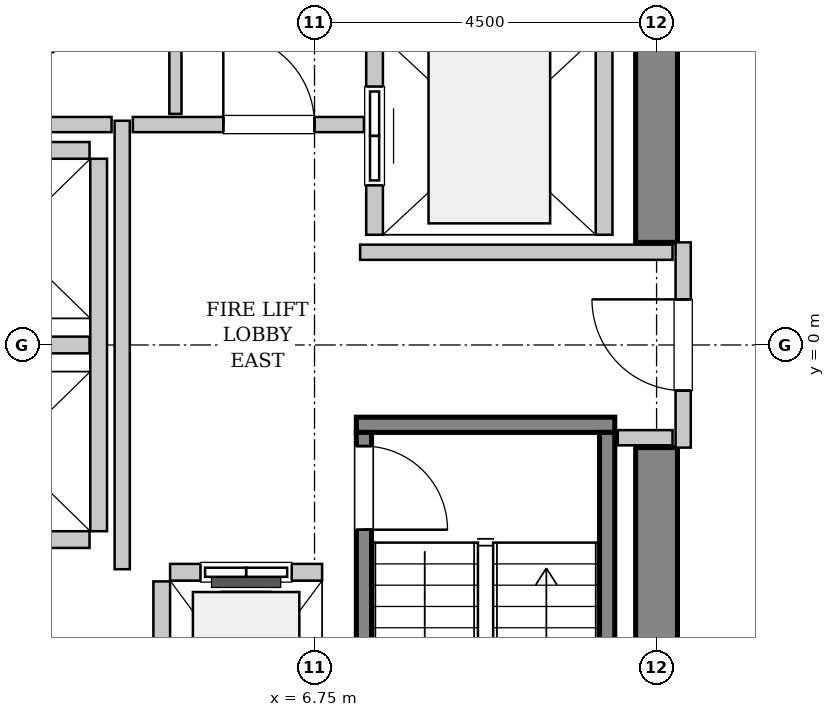
"""IFC4 building model, lengths in metres.
Left out: names, types, materials, properties, quantities, classifications, styles, units other than length and angle.
Written with IfcOpenShell. Run it as: python <this file> out.ifc"""

import sys

from ifc_helpers import new_model, si_unit, direction, frame, frame_2d, origin, place, context, subcontext, project, spatial, rectangle, extrude, source, transform, mapped, element, fill, save


model = new_model("IFC4")
c1 = context("Model", 3, precision=1e-05, world=origin(), true_north=direction((0.0, 1.0)))
c2 = subcontext(c1, "Body", "Model", "MODEL_VIEW")
j1 = project(units=[si_unit("LENGTHUNIT", "METRE"), si_unit("PLANEANGLEUNIT", "RADIAN")], contexts=[c1])
p1 = place(None, origin())
s1 = spatial("IfcSite", under=j1, at=p1, CompositionType="ELEMENT")
p2 = place(p1, origin())
s2 = spatial("IfcBuilding", under=s1, at=p2, CompositionType="ELEMENT")
p3 = place(p2, frame((0.0, 0.0, 152.6)))
s3 = spatial("IfcBuildingStorey", under=s2, at=p3, CompositionType="ELEMENT", Elevation=152.6)
m1 = source(origin(), c2, "Body", "SweptSolid", [
    extrude(rectangle(XDim=7.375, YDim=0.55, at=frame_2d((3.688, 0.0))), origin(), (0.0, 0.0, 1.0), 3.8),
])
for number, where, z_axis, x_axis in (
    (1, (11.25, -8.725, 0.0), (0.0, 0.0, 1.0), (0.0, 1.0, 0.0)),
    (2, (11.25, 1.35, 0.0), (0.0, 0.0, 1.0), (0.0, 1.0, 0.0)),
):
    element("IfcWall", number, at=place(p3, frame(where, z_axis=z_axis, x_axis=x_axis)), inside=s3, PredefinedType="SHEAR", context=c2, shape_type="MappedRepresentation", body=[
        mapped(m1, transform((0.0, 0.0, 0.0), x_axis=(1.0, 0.0, 0.0), y_axis=(0.0, 1.0, 0.0), z_axis=(0.0, 0.0, 1.0), scale=1.0)),
    ])
m2 = source(origin(), c2, "Body", "SweptSolid", [
    extrude(rectangle(XDim=3.4, YDim=0.2, at=frame_2d((1.7, 0.0))), origin(), (0.0, 0.0, 1.0), 3.8),
])
p4 = place(p3, frame((7.3, -1.05, 0.0), z_axis=(0.0, 0.0, 1.0), x_axis=(1.0, 0.0, 0.0)))
e3 = element("IfcWall", 3, at=p4, inside=s3, PredefinedType="SOLIDWALL", context=c2, shape_type="MappedRepresentation", body=[
    mapped(m2, transform((0.0, 0.0, 0.0), x_axis=(1.0, 0.0, 0.0), y_axis=(0.0, 1.0, 0.0), z_axis=(0.0, 0.0, 1.0), scale=1.0)),
])
m3 = source(origin(), c2, "Body", "SweptSolid", [
    extrude(rectangle(XDim=7.1, YDim=0.2, at=frame_2d((3.55, 0.0))), origin(), (0.0, 0.0, 1.0), 3.8),
])
p5 = place(p3, frame((7.4, -1.15, 0.0), z_axis=(0.0, 0.0, 1.0), x_axis=(0.0, -1.0, 0.0)))
e4 = element("IfcWall", 4, at=p5, inside=s3, PredefinedType="SOLIDWALL", context=c2, shape_type="MappedRepresentation", body=[
    mapped(m3, transform((0.0, 0.0, 0.0), x_axis=(1.0, 0.0, 0.0), y_axis=(0.0, 1.0, 0.0), z_axis=(0.0, 0.0, 1.0), scale=1.0)),
])
p6 = place(p5, frame((0.18, 0.0, 0.0)))
e5 = element("IfcOpeningElement", 5, at=p6, cuts=e4, PredefinedType="OPENING", context=c2, shape_type="SweptSolid", body=[
    extrude(rectangle(XDim=1.1, YDim=2.15, at=frame_2d((0.55, 1.075))), frame((0.0, 0.11, 0.0), z_axis=(0.0, -1.0, 0.0), x_axis=(1.0, 0.0, 0.0)), (0.0, 0.0, 1.0), 0.22),
])
p7 = place(p3, frame((10.6, -1.15, 0.0), z_axis=(0.0, 0.0, 1.0), x_axis=(0.0, -1.0, 0.0)))
e6 = element("IfcWall", 6, at=p7, inside=s3, PredefinedType="SOLIDWALL", context=c2, shape_type="MappedRepresentation", body=[
    mapped(m3, transform((0.0, 0.0, 0.0), x_axis=(1.0, 0.0, 0.0), y_axis=(0.0, 1.0, 0.0), z_axis=(0.0, 0.0, 1.0), scale=1.0)),
])
m4 = source(origin(), c2, "Body", "SweptSolid", [
    extrude(rectangle(XDim=2.0, YDim=0.22, at=frame_2d((1.0, 0.0))), origin(), (0.0, 0.0, 1.0), 3.535),
])
p8 = place(p3, frame((6.85, -2.99, 0.0), z_axis=(0.0, 0.0, 1.0), x_axis=(-1.0, 0.0, 0.0)))
e7 = element("IfcWall", 7, at=p8, inside=s3, PredefinedType="SOLIDWALL", context=c2, shape_type="MappedRepresentation", body=[
    mapped(m4, transform((0.0, 0.0, 0.0), x_axis=(1.0, 0.0, 0.0), y_axis=(0.0, 1.0, 0.0), z_axis=(0.0, 0.0, 1.0), scale=1.0)),
])
p9 = place(p8, frame((0.4, 0.0, 0.0)))
e8 = element("IfcOpeningElement", 8, at=p9, cuts=e7, PredefinedType="OPENING", context=c2, shape_type="SweptSolid", body=[
    extrude(rectangle(XDim=1.2, YDim=2.2, at=frame_2d((0.6, 1.1))), frame((0.0, 0.12, 0.0), z_axis=(0.0, -1.0, 0.0), x_axis=(1.0, 0.0, 0.0)), (0.0, 0.0, 1.0), 0.24),
])
m5 = source(origin(), c2, "Body", "SweptSolid", [
    extrude(rectangle(XDim=2.68, YDim=0.22, at=frame_2d((1.34, 0.0))), origin(), (0.0, 0.0, 1.0), 3.535),
])
p10 = place(p3, frame((4.74, -3.11, 0.0), z_axis=(0.0, 0.0, 1.0), x_axis=(0.0, -1.0, 0.0)))
e9 = element("IfcWall", 9, at=p10, inside=s3, PredefinedType="SOLIDWALL", context=c2, shape_type="MappedRepresentation", body=[
    mapped(m5, transform((0.0, 0.0, 0.0), x_axis=(1.0, 0.0, 0.0), y_axis=(0.0, 1.0, 0.0), z_axis=(0.0, 0.0, 1.0), scale=1.0)),
])
m6 = source(origin(), c2, "Body", "SweptSolid", [
    extrude(rectangle(XDim=5.45, YDim=0.22, at=frame_2d((2.725, 0.0))), origin(), (0.0, 0.0, 1.0), 3.535),
])
p11 = place(p3, frame((7.54, 6.9, 0.0), z_axis=(0.0, 0.0, 1.0), x_axis=(0.0, -1.0, 0.0)))
e10 = element("IfcWall", 10, at=p11, inside=s3, PredefinedType="SOLIDWALL", context=c2, shape_type="MappedRepresentation", body=[
    mapped(m6, transform((0.0, 0.0, 0.0), x_axis=(1.0, 0.0, 0.0), y_axis=(0.0, 1.0, 0.0), z_axis=(0.0, 0.0, 1.0), scale=1.0)),
])
p12 = place(p11, frame((3.5, 0.0, 0.0)))
e11 = element("IfcOpeningElement", 11, at=p12, cuts=e10, PredefinedType="OPENING", context=c2, shape_type="SweptSolid", body=[
    extrude(rectangle(XDim=1.3, YDim=2.3, at=frame_2d((0.65, 1.15))), frame((0.0, 0.12, 0.0), z_axis=(0.0, -1.0, 0.0), x_axis=(1.0, 0.0, 0.0)), (0.0, 0.0, 1.0), 0.24),
])
p13 = place(p11, frame((0.65, 0.0, 0.0)))
e12 = element("IfcOpeningElement", 12, at=p13, cuts=e10, PredefinedType="OPENING", context=c2, shape_type="SweptSolid", body=[
    extrude(rectangle(XDim=1.3, YDim=2.3, at=frame_2d((0.65, 1.15))), frame((0.0, 0.12, 0.0), z_axis=(0.0, -1.0, 0.0), x_axis=(1.0, 0.0, 0.0)), (0.0, 0.0, 1.0), 0.24),
])
p14 = place(p3, frame((10.56, 1.45, 0.0), z_axis=(0.0, 0.0, 1.0), x_axis=(0.0, 1.0, 0.0)))
e13 = element("IfcWall", 13, at=p14, inside=s3, PredefinedType="SOLIDWALL", context=c2, shape_type="MappedRepresentation", body=[
    mapped(m6, transform((0.0, 0.0, 0.0), x_axis=(1.0, 0.0, 0.0), y_axis=(0.0, 1.0, 0.0), z_axis=(0.0, 0.0, 1.0), scale=1.0)),
])
m7 = source(origin(), c2, "Body", "SweptSolid", [
    extrude(rectangle(XDim=4.9, YDim=0.22, at=frame_2d((2.45, 0.0))), origin(), (0.0, 0.0, 1.0), 3.535),
])
p15 = place(p3, frame((3.91, -2.45, 0.0), z_axis=(0.0, 0.0, 1.0), x_axis=(0.0, 1.0, 0.0)))
e14 = element("IfcWall", 14, at=p15, inside=s3, PredefinedType="SOLIDWALL", context=c2, shape_type="MappedRepresentation", body=[
    mapped(m7, transform((0.0, 0.0, 0.0), x_axis=(1.0, 0.0, 0.0), y_axis=(0.0, 1.0, 0.0), z_axis=(0.0, 0.0, 1.0), scale=1.0)),
])
m8 = source(origin(), c2, "Body", "SweptSolid", [
    extrude(rectangle(XDim=2.13, YDim=0.22, at=frame_2d((1.065, 0.0))), origin(), (0.0, 0.0, 1.0), 3.535),
])
for number, where, z_axis, x_axis in (
    (15, (1.66, -2.56, 0.0), (0.0, 0.0, 1.0), (1.0, 0.0, 0.0)),
    (16, (1.66, 0.0, 0.0), (0.0, 0.0, 1.0), (1.0, 0.0, 0.0)),
    (17, (3.79, 2.56, 0.0), (0.0, 0.0, 1.0), (-1.0, 0.0, 0.0)),
):
    element("IfcWall", number, at=place(p3, frame(where, z_axis=z_axis, x_axis=x_axis)), inside=s3, PredefinedType="SOLIDWALL", context=c2, shape_type="MappedRepresentation", body=[
        mapped(m8, transform((0.0, 0.0, 0.0), x_axis=(1.0, 0.0, 0.0), y_axis=(0.0, 1.0, 0.0), z_axis=(0.0, 0.0, 1.0), scale=1.0)),
    ])
m9 = source(origin(), c2, "Body", "SweptSolid", [
    extrude(rectangle(XDim=2.7, YDim=0.2, at=frame_2d((1.35, 0.0))), origin(), (0.0, 0.0, 1.0), 2.425),
])
p16 = place(p3, frame((11.6, -1.35, 0.0), z_axis=(0.0, 0.0, 1.0), x_axis=(0.0, 1.0, 0.0)))
e18 = element("IfcWall", 18, at=p16, inside=s3, PredefinedType="PARTITIONING", context=c2, shape_type="MappedRepresentation", body=[
    mapped(m9, transform((0.0, 0.0, 0.0), x_axis=(1.0, 0.0, 0.0), y_axis=(0.0, 1.0, 0.0), z_axis=(0.0, 0.0, 1.0), scale=1.0)),
])
p17 = place(p16, frame((0.75, 0.0, 0.0)))
e19 = element("IfcOpeningElement", 19, at=p17, cuts=e18, PredefinedType="OPENING", context=c2, shape_type="SweptSolid", body=[
    extrude(rectangle(XDim=1.2, YDim=2.15, at=frame_2d((0.6, 1.075))), frame((0.0, 0.11, 0.0), z_axis=(0.0, -1.0, 0.0), x_axis=(1.0, 0.0, 0.0)), (0.0, 0.0, 1.0), 0.22),
])
m10 = source(origin(), c2, "Body", "SweptSolid", [
    extrude(rectangle(XDim=5.9, YDim=0.2, at=frame_2d((2.95, 0.0))), origin(), (0.0, 0.0, 1.0), 3.535),
])
p18 = place(p3, frame((4.22, -2.95, 0.0), z_axis=(0.0, 0.0, 1.0), x_axis=(0.0, 1.0, 0.0)))
e20 = element("IfcWall", 20, at=p18, inside=s3, PredefinedType="PARTITIONING", context=c2, shape_type="MappedRepresentation", body=[
    mapped(m10, transform((0.0, 0.0, 0.0), x_axis=(1.0, 0.0, 0.0), y_axis=(0.0, 1.0, 0.0), z_axis=(0.0, 0.0, 1.0), scale=1.0)),
])
m11 = source(origin(), c2, "Body", "SweptSolid", [
    extrude(rectangle(XDim=2.52, YDim=0.2, at=frame_2d((1.26, 0.0))), origin(), (0.0, 0.0, 1.0), 3.535),
])
p19 = place(p3, frame((1.56, 2.9, 0.0), z_axis=(0.0, 0.0, 1.0), x_axis=(1.0, 0.0, 0.0)))
e21 = element("IfcWall", 21, at=p19, inside=s3, PredefinedType="PARTITIONING", context=c2, shape_type="MappedRepresentation", body=[
    mapped(m11, transform((0.0, 0.0, 0.0), x_axis=(1.0, 0.0, 0.0), y_axis=(0.0, 1.0, 0.0), z_axis=(0.0, 0.0, 1.0), scale=1.0)),
])
m12 = source(origin(), c2, "Body", "SweptSolid", [
    extrude(rectangle(XDim=3.04, YDim=0.2, at=frame_2d((1.52, 0.0))), origin(), (0.0, 0.0, 1.0), 3.535),
])
p20 = place(p3, frame((4.36, 2.9, 0.0), z_axis=(0.0, 0.0, 1.0), x_axis=(1.0, 0.0, 0.0)))
e22 = element("IfcWall", 22, at=p20, inside=s3, PredefinedType="PARTITIONING", context=c2, shape_type="MappedRepresentation", body=[
    mapped(m12, transform((0.0, 0.0, 0.0), x_axis=(1.0, 0.0, 0.0), y_axis=(0.0, 1.0, 0.0), z_axis=(0.0, 0.0, 1.0), scale=1.0)),
])
p21 = place(p20, frame((1.19, 0.0, 0.0)))
e23 = element("IfcOpeningElement", 23, at=p21, cuts=e22, PredefinedType="OPENING", context=c2, shape_type="SweptSolid", body=[
    extrude(rectangle(XDim=1.2, YDim=2.15, at=frame_2d((0.6, 1.075))), frame((0.0, 0.11, 0.0), z_axis=(0.0, -1.0, 0.0), x_axis=(1.0, 0.0, 0.0)), (0.0, 0.0, 1.0), 0.22),
])
m13 = source(origin(), c2, "Body", "SweptSolid", [
    extrude(rectangle(XDim=4.11, YDim=0.2, at=frame_2d((2.055, 0.0))), origin(), (0.0, 0.0, 1.0), 3.535),
])
p22 = place(p3, frame((7.35, 1.22, 0.0), z_axis=(0.0, 0.0, 1.0), x_axis=(1.0, 0.0, 0.0)))
e24 = element("IfcWall", 24, at=p22, inside=s3, PredefinedType="PARTITIONING", context=c2, shape_type="MappedRepresentation", body=[
    mapped(m13, transform((0.0, 0.0, 0.0), x_axis=(1.0, 0.0, 0.0), y_axis=(0.0, 1.0, 0.0), z_axis=(0.0, 0.0, 1.0), scale=1.0)),
])
m14 = source(origin(), c2, "Body", "SweptSolid", [
    extrude(rectangle(XDim=0.72, YDim=0.2, at=frame_2d((0.36, 0.0))), origin(), (0.0, 0.0, 1.0), 3.535),
])
p23 = place(p3, frame((10.74, -1.22, 0.0), z_axis=(0.0, 0.0, 1.0), x_axis=(1.0, 0.0, 0.0)))
e25 = element("IfcWall", 25, at=p23, inside=s3, PredefinedType="PARTITIONING", context=c2, shape_type="MappedRepresentation", body=[
    mapped(m14, transform((0.0, 0.0, 0.0), x_axis=(1.0, 0.0, 0.0), y_axis=(0.0, 1.0, 0.0), z_axis=(0.0, 0.0, 1.0), scale=1.0)),
])
m15 = source(origin(), c2, "Body", "SweptSolid", [
    extrude(rectangle(XDim=5.45, YDim=0.16, at=frame_2d((2.725, 0.0))), origin(), (0.0, 0.0, 1.0), 3.535),
])
p24 = place(p3, frame((4.92, 3.04, 0.0), z_axis=(0.0, 0.0, 1.0), x_axis=(0.0, 1.0, 0.0)))
e26 = element("IfcWall", 26, at=p24, inside=s3, PredefinedType="PARTITIONING", context=c2, shape_type="MappedRepresentation", body=[
    mapped(m15, transform((0.0, 0.0, 0.0), x_axis=(1.0, 0.0, 0.0), y_axis=(0.0, 1.0, 0.0), z_axis=(0.0, 0.0, 1.0), scale=1.0)),
])
m16 = source(origin(), c2, "Body", "SweptSolid", [
    extrude(rectangle(XDim=1.1, YDim=2.15, at=frame_2d((0.55, 1.075))), frame((0.0, 0.025, 0.0), z_axis=(0.0, -1.0, 0.0), x_axis=(1.0, 0.0, 0.0)), (0.0, 0.0, 1.0), 0.05),
])
p25 = place(p6, origin())
e27 = element("IfcDoor", 27, at=p25, inside=s3, OperationType="SINGLE_SWING_RIGHT", PredefinedType="DOOR", context=c2, shape_type="MappedRepresentation", body=[
    mapped(m16, transform((0.0, 0.0, 0.0), x_axis=(1.0, 0.0, 0.0), y_axis=(0.0, 1.0, 0.0), z_axis=(0.0, 0.0, 1.0), scale=1.0)),
])
fill(e5, e27)
m17 = source(origin(), c2, "Body", "SweptSolid", [
    extrude(rectangle(XDim=1.2, YDim=2.2, at=frame_2d((0.6, 1.1))), frame((0.0, 0.025, 0.0), z_axis=(0.0, -1.0, 0.0), x_axis=(1.0, 0.0, 0.0)), (0.0, 0.0, 1.0), 0.05),
])
p26 = place(p9, origin())
e28 = element("IfcDoor", 28, at=p26, inside=s3, OperationType="SLIDING_TO_LEFT", PredefinedType="DOOR", context=c2, shape_type="MappedRepresentation", body=[
    mapped(m17, transform((0.0, 0.0, 0.0), x_axis=(1.0, 0.0, 0.0), y_axis=(0.0, 1.0, 0.0), z_axis=(0.0, 0.0, 1.0), scale=1.0)),
])
fill(e8, e28)
m18 = source(origin(), c2, "Body", "SweptSolid", [
    extrude(rectangle(XDim=1.3, YDim=2.3, at=frame_2d((0.65, 1.15))), frame((0.0, 0.025, 0.0), z_axis=(0.0, -1.0, 0.0), x_axis=(1.0, 0.0, 0.0)), (0.0, 0.0, 1.0), 0.05),
])
p27 = place(p12, origin())
e29 = element("IfcDoor", 29, at=p27, inside=s3, OperationType="SLIDING_TO_RIGHT", PredefinedType="DOOR", context=c2, shape_type="MappedRepresentation", body=[
    mapped(m18, transform((0.0, 0.0, 0.0), x_axis=(1.0, 0.0, 0.0), y_axis=(0.0, 1.0, 0.0), z_axis=(0.0, 0.0, 1.0), scale=1.0)),
])
fill(e11, e29)
m19 = source(origin(), c2, "Body", "SweptSolid", [
    extrude(rectangle(XDim=1.2, YDim=2.15, at=frame_2d((0.6, 1.075))), frame((0.0, 0.025, 0.0), z_axis=(0.0, -1.0, 0.0), x_axis=(1.0, 0.0, 0.0)), (0.0, 0.0, 1.0), 0.05),
])
p28 = place(p17, origin())
e30 = element("IfcDoor", 30, at=p28, inside=s3, OperationType="SINGLE_SWING_RIGHT", PredefinedType="DOOR", context=c2, shape_type="MappedRepresentation", body=[
    mapped(m19, transform((0.0, 0.0, 0.0), x_axis=(1.0, 0.0, 0.0), y_axis=(0.0, 1.0, 0.0), z_axis=(0.0, 0.0, 1.0), scale=1.0)),
])
fill(e19, e30)
p29 = place(p21, origin())
e31 = element("IfcDoor", 31, at=p29, inside=s3, OperationType="SINGLE_SWING_LEFT", PredefinedType="DOOR", context=c2, shape_type="MappedRepresentation", body=[
    mapped(m19, transform((0.0, 0.0, 0.0), x_axis=(1.0, 0.0, 0.0), y_axis=(0.0, 1.0, 0.0), z_axis=(0.0, 0.0, 1.0), scale=1.0)),
])
fill(e23, e31)
save(model, sys.argv[1])
